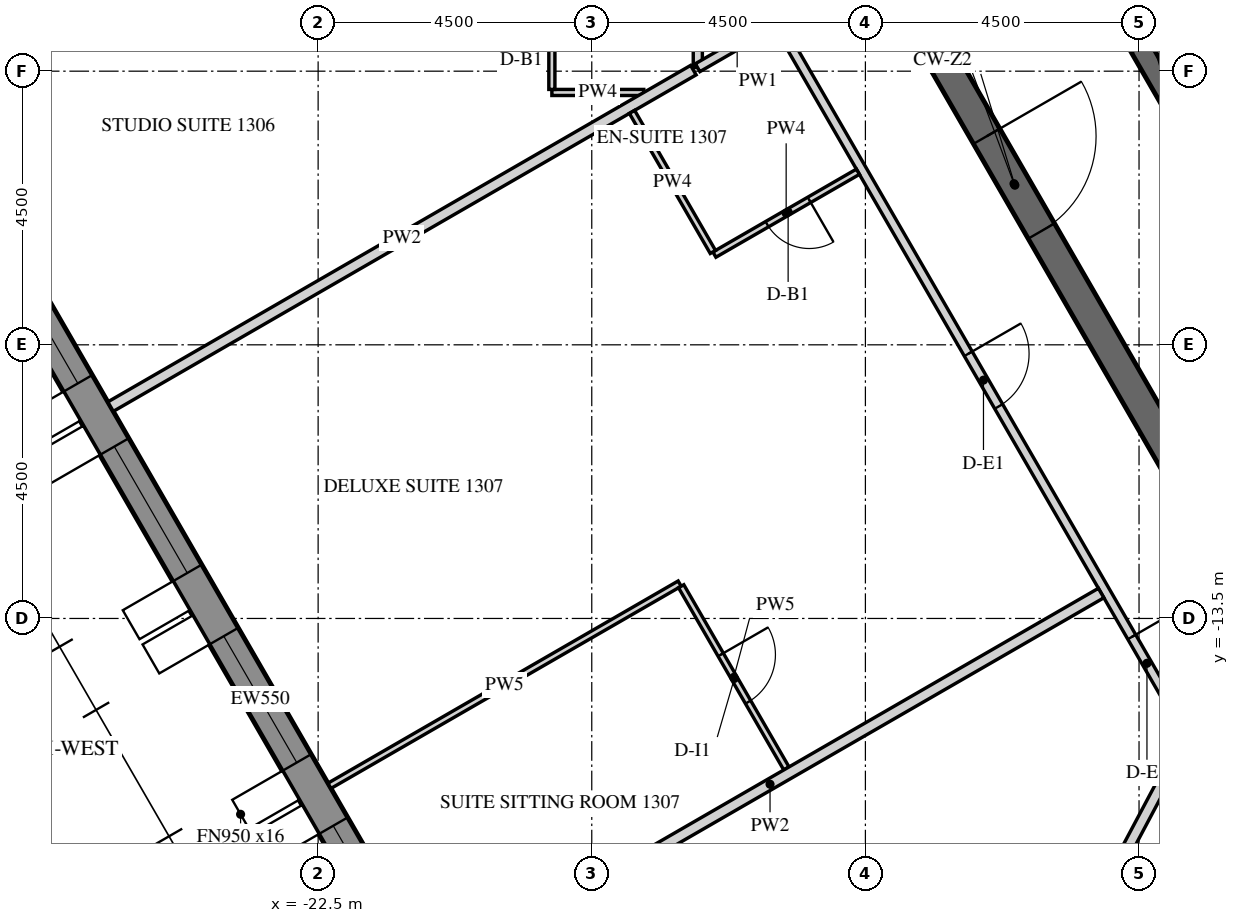
"""IFC4 building model, lengths in metres.
Left out: names, types, materials, properties, quantities, classifications, styles, units other than length and angle.
Written with IfcOpenShell. Run it as: python <this file> out.ifc"""

import sys

from ifc_helpers import new_model, si_unit, direction, frame, frame_2d, origin, place, context, subcontext, project, spatial, polyline, rectangle, outline, extrude, element, fill, save


model = new_model("IFC4")
c1 = context("Model", 3, precision=1e-05, world=origin(), true_north=direction((0.0, 1.0)))
c2 = subcontext(c1, "Body", "Model", "MODEL_VIEW")
j1 = project(units=[si_unit("LENGTHUNIT", "METRE"), si_unit("PLANEANGLEUNIT", "RADIAN")], contexts=[c1])
p1 = place(None, origin())
s1 = spatial("IfcSite", under=j1, at=p1, CompositionType="ELEMENT")
p2 = place(p1, origin())
s2 = spatial("IfcBuilding", under=s1, at=p2, CompositionType="ELEMENT")
p3 = place(p2, frame((0.0, 0.0, 176.1)))
s3 = spatial("IfcBuildingStorey", under=s2, at=p3, CompositionType="ELEMENT", Elevation=176.1)
p4 = place(p3, frame((-30.391, -2.811, -0.15), z_axis=(0.0, 0.0, 1.0), x_axis=(0.499998569178, -0.866026229868, 0.0)))
e1 = element("IfcWall", 1, at=p4, inside=s3, PredefinedType="SOLIDWALL", context=c2, shape_type="SweptSolid", body=[
    extrude(outline(polyline([(-0.022, -0.275), (27.783, -0.275), (27.732, 0.275), (0.022, 0.275), (-0.022, -0.275)])), origin(), (0.0, 0.0, 1.0), 3.9),
])
p5 = place(p4, frame((1.879, 0.0, 1.05)))
e2 = element("IfcOpeningElement", 2, at=p5, cuts=e1, PredefinedType="OPENING", context=c2, shape_type="SweptSolid", body=[
    extrude(rectangle(XDim=2.4, YDim=2.4, at=frame_2d((1.2, 1.2))), frame((0.0, 0.285, 0.0), z_axis=(0.0, -1.0, 0.0), x_axis=(1.0, 0.0, 0.0)), (0.0, 0.0, 1.0), 0.57),
])
p6 = place(p4, frame((5.479, 0.0, 1.05)))
e3 = element("IfcOpeningElement", 3, at=p6, cuts=e1, PredefinedType="OPENING", context=c2, shape_type="SweptSolid", body=[
    extrude(rectangle(XDim=2.4, YDim=2.4, at=frame_2d((1.2, 1.2))), frame((0.0, 0.285, 0.0), z_axis=(0.0, -1.0, 0.0), x_axis=(1.0, 0.0, 0.0)), (0.0, 0.0, 1.0), 0.57),
])
p7 = place(p4, frame((9.079, 0.0, 1.05)))
e4 = element("IfcOpeningElement", 4, at=p7, cuts=e1, PredefinedType="OPENING", context=c2, shape_type="SweptSolid", body=[
    extrude(rectangle(XDim=2.4, YDim=2.4, at=frame_2d((1.2, 1.2))), frame((0.0, 0.285, 0.0), z_axis=(0.0, -1.0, 0.0), x_axis=(1.0, 0.0, 0.0)), (0.0, 0.0, 1.0), 0.57),
])
p8 = place(p4, frame((12.679, 0.0, 1.05)))
e5 = element("IfcOpeningElement", 5, at=p8, cuts=e1, PredefinedType="OPENING", context=c2, shape_type="SweptSolid", body=[
    extrude(rectangle(XDim=2.4, YDim=2.4, at=frame_2d((1.2, 1.2))), frame((0.0, 0.285, 0.0), z_axis=(0.0, -1.0, 0.0), x_axis=(1.0, 0.0, 0.0)), (0.0, 0.0, 1.0), 0.57),
])
p9 = place(p4, frame((16.279, 0.0, 1.05)))
e6 = element("IfcOpeningElement", 6, at=p9, cuts=e1, PredefinedType="OPENING", context=c2, shape_type="SweptSolid", body=[
    extrude(rectangle(XDim=2.4, YDim=2.4, at=frame_2d((1.2, 1.2))), frame((0.0, 0.285, 0.0), z_axis=(0.0, -1.0, 0.0), x_axis=(1.0, 0.0, 0.0)), (0.0, 0.0, 1.0), 0.57),
])
p10 = place(p4, frame((19.879, 0.0, 1.05)))
e7 = element("IfcOpeningElement", 7, at=p10, cuts=e1, PredefinedType="OPENING", context=c2, shape_type="SweptSolid", body=[
    extrude(rectangle(XDim=2.4, YDim=2.4, at=frame_2d((1.2, 1.2))), frame((0.0, 0.285, 0.0), z_axis=(0.0, -1.0, 0.0), x_axis=(1.0, 0.0, 0.0)), (0.0, 0.0, 1.0), 0.57),
])
p11 = place(p4, frame((23.479, 0.0, 1.05)))
e8 = element("IfcOpeningElement", 8, at=p11, cuts=e1, PredefinedType="OPENING", context=c2, shape_type="SweptSolid", body=[
    extrude(rectangle(XDim=2.4, YDim=2.4, at=frame_2d((1.2, 1.2))), frame((0.0, 0.285, 0.0), z_axis=(0.0, -1.0, 0.0), x_axis=(1.0, 0.0, 0.0)), (0.0, 0.0, 1.0), 0.57),
])
p12 = place(p3, frame((-14.722, 0.0, -0.15), z_axis=(0.0, 0.0, 1.0), x_axis=(0.50000571537, -0.866022103989, 0.0)))
e9 = element("IfcWall", 9, at=p12, inside=s3, PredefinedType="SHEAR", context=c2, shape_type="SweptSolid", body=[
    extrude(outline(polyline([(-0.144, -0.25), (14.867, -0.25), (14.578, 0.25), (0.144, 0.25), (-0.144, -0.25)])), origin(), (0.0, 0.0, 1.0), 3.9),
])
p13 = place(p12, frame((6.432, 0.0, 0.15)))
e10 = element("IfcOpeningElement", 10, at=p13, cuts=e9, PredefinedType="OPENING", context=c2, shape_type="SweptSolid", body=[
    extrude(rectangle(XDim=1.8, YDim=2.4, at=frame_2d((0.9, 1.2))), frame((0.0, 0.26, 0.0), z_axis=(0.0, -1.0, 0.0), x_axis=(1.0, 0.0, 0.0)), (0.0, 0.0, 1.0), 0.52),
])
p14 = place(p3, frame((-11.345, 0.0, -0.15), z_axis=(0.0, 0.0, 1.0), x_axis=(0.499995046907, -0.866028263435, 0.0)))
e11 = element("IfcWall", 11, at=p14, inside=s3, PredefinedType="SHEAR", context=c2, shape_type="SweptSolid", body=[
    extrude(outline(polyline([(-0.101, -0.175), (11.446, -0.175), (11.244, 0.175), (0.101, 0.175), (-0.101, -0.175)])), origin(), (0.0, 0.0, 1.0), 3.9),
])
p15 = place(p14, frame((4.744, 0.0, 0.15)))
e12 = element("IfcOpeningElement", 12, at=p15, cuts=e11, PredefinedType="OPENING", context=c2, shape_type="SweptSolid", body=[
    extrude(rectangle(XDim=1.8, YDim=2.4, at=frame_2d((0.9, 1.2))), frame((0.0, 0.185, 0.0), z_axis=(0.0, -1.0, 0.0), x_axis=(1.0, 0.0, 0.0)), (0.0, 0.0, 1.0), 0.37),
])
p16 = place(p3, frame((-16.256, -2.125, 0.0), z_axis=(0.0, 0.0, 1.0), x_axis=(0.0, -1.0, 0.0)))
e13 = element("IfcWall", 13, at=p16, inside=s3, PredefinedType="PARTITIONING", context=c2, shape_type="SweptSolid", body=[
    extrude(rectangle(XDim=2.316, YDim=0.15, at=frame_2d((1.158, 0.0))), origin(), (0.0, 0.0, 1.0), 2.988),
])
p17 = place(p3, frame((-14.921, -3.757, 0.0), z_axis=(0.0, 0.0, 1.0), x_axis=(0.500001980452, -0.866024260367, 0.0)))
e14 = element("IfcWall", 14, at=p17, inside=s3, PredefinedType="PARTITIONING", context=c2, shape_type="SweptSolid", body=[
    extrude(rectangle(XDim=12.752, YDim=0.15, at=frame_2d((6.376, 0.0))), origin(), (0.0, 0.0, 1.0), 2.988),
])
p18 = place(p17, frame((6.225, 0.0, 0.0)))
e15 = element("IfcOpeningElement", 15, at=p18, cuts=e14, PredefinedType="OPENING", context=c2, shape_type="SweptSolid", body=[
    extrude(rectangle(XDim=1.0, YDim=2.1, at=frame_2d((0.5, 1.05))), frame((0.0, 0.085, 0.0), z_axis=(0.0, -1.0, 0.0), x_axis=(1.0, 0.0, 0.0)), (0.0, 0.0, 1.0), 0.17),
])
p19 = place(p17, frame((11.602, 0.0, 0.0)))
e16 = element("IfcOpeningElement", 16, at=p19, cuts=e14, PredefinedType="OPENING", context=c2, shape_type="SweptSolid", body=[
    extrude(rectangle(XDim=1.0, YDim=2.1, at=frame_2d((0.5, 1.05))), frame((0.0, 0.085, 0.0), z_axis=(0.0, -1.0, 0.0), x_axis=(1.0, 0.0, 0.0)), (0.0, 0.0, 1.0), 0.17),
])
p20 = place(p3, frame((-16.259, -4.443, 0.0), z_axis=(0.0, 0.0, 1.0), x_axis=(0.866004263386, 0.500036614457, 0.0)))
e17 = element("IfcWall", 17, at=p20, inside=s3, PredefinedType="PARTITIONING", context=c2, shape_type="SweptSolid", body=[
    extrude(rectangle(XDim=1.502, YDim=0.15, at=frame_2d((0.751, 0.0))), origin(), (0.0, 0.0, 1.0), 2.988),
])
p21 = place(p3, frame((-17.145, -4.85, 0.0), z_axis=(0.0, 0.0, 1.0), x_axis=(-1.0, 0.0, 0.0)))
e18 = element("IfcWall", 18, at=p21, inside=s3, PredefinedType="PARTITIONING", context=c2, shape_type="SweptSolid", body=[
    extrude(rectangle(XDim=1.511, YDim=0.1, at=frame_2d((0.756, 0.0))), origin(), (0.0, 0.0, 1.0), 2.988),
])
p22 = place(p3, frame((-18.656, -4.8, 0.0), z_axis=(0.0, 0.0, 1.0), x_axis=(0.0, 1.0, 0.0)))
e19 = element("IfcWall", 19, at=p22, inside=s3, PredefinedType="PARTITIONING", context=c2, shape_type="SweptSolid", body=[
    extrude(rectangle(XDim=2.675, YDim=0.1, at=frame_2d((1.337, 0.0))), origin(), (0.0, 0.0, 1.0), 2.988),
])
p23 = place(p22, frame((0.95, 0.0, 0.0)))
e20 = element("IfcOpeningElement", 20, at=p23, cuts=e19, PredefinedType="OPENING", context=c2, shape_type="SweptSolid", body=[
    extrude(rectangle(XDim=0.8, YDim=2.1, at=frame_2d((0.4, 1.05))), frame((0.0, 0.06, 0.0), z_axis=(0.0, -1.0, 0.0), x_axis=(1.0, 0.0, 0.0)), (0.0, 0.0, 1.0), 0.12),
])
p24 = place(p3, frame((-25.914, -10.017, 0.0), z_axis=(0.0, 0.0, 1.0), x_axis=(0.866021744024, 0.500006338837, 0.0)))
e21 = element("IfcWall", 21, at=p24, inside=s3, PredefinedType="PARTITIONING", context=c2, shape_type="SweptSolid", body=[
    extrude(rectangle(XDim=11.067, YDim=0.18, at=frame_2d((5.534, 0.0))), origin(), (0.0, 0.0, 1.0), 2.988),
])
p25 = place(p3, frame((-13.623, -6.154, 0.0), z_axis=(0.0, 0.0, 1.0), x_axis=(-0.866051307416, -0.49995513091, 0.0)))
e22 = element("IfcWall", 22, at=p25, inside=s3, PredefinedType="PARTITIONING", context=c2, shape_type="SweptSolid", body=[
    extrude(rectangle(XDim=2.725, YDim=0.1, at=frame_2d((1.362, 0.0))), origin(), (0.0, 0.0, 1.0), 2.988),
])
p26 = place(p25, frame((0.925, 0.0, 0.0)))
e23 = element("IfcOpeningElement", 23, at=p26, cuts=e22, PredefinedType="OPENING", context=c2, shape_type="SweptSolid", body=[
    extrude(rectangle(XDim=0.8, YDim=2.1, at=frame_2d((0.4, 1.05))), frame((0.0, 0.06, 0.0), z_axis=(0.0, -1.0, 0.0), x_axis=(1.0, 0.0, 0.0)), (0.0, 0.0, 1.0), 0.12),
])
p27 = place(p3, frame((-16.008, -7.473, 0.0), z_axis=(0.0, 0.0, 1.0), x_axis=(-0.500008456887, 0.866020521143, 0.0)))
e24 = element("IfcWall", 24, at=p27, inside=s3, PredefinedType="PARTITIONING", context=c2, shape_type="SweptSolid", body=[
    extrude(rectangle(XDim=2.66, YDim=0.1, at=frame_2d((1.33, 0.0))), origin(), (0.0, 0.0, 1.0), 2.988),
])
p28 = place(p3, frame((-22.313, -16.252, 0.0), z_axis=(0.0, 0.0, 1.0), x_axis=(0.866027239912, 0.49999681972, 0.0)))
e25 = element("IfcWall", 25, at=p28, inside=s3, PredefinedType="PARTITIONING", context=c2, shape_type="SweptSolid", body=[
    extrude(rectangle(XDim=6.65, YDim=0.1, at=frame_2d((3.325, 0.0))), origin(), (0.0, 0.0, 1.0), 2.988),
])
p29 = place(p3, frame((-16.529, -12.97, 0.0), z_axis=(0.0, 0.0, 1.0), x_axis=(0.499978980201, -0.866037539231, 0.0)))
e26 = element("IfcWall", 26, at=p29, inside=s3, PredefinedType="PARTITIONING", context=c2, shape_type="SweptSolid", body=[
    extrude(rectangle(XDim=3.46, YDim=0.1, at=frame_2d((1.73, 0.0))), origin(), (0.0, 0.0, 1.0), 2.988),
])
p30 = place(p29, frame((1.3, 0.0, 0.0)))
e27 = element("IfcOpeningElement", 27, at=p30, cuts=e26, PredefinedType="OPENING", context=c2, shape_type="SweptSolid", body=[
    extrude(rectangle(XDim=0.9, YDim=2.1, at=frame_2d((0.45, 1.05))), frame((0.0, 0.06, 0.0), z_axis=(0.0, -1.0, 0.0), x_axis=(1.0, 0.0, 0.0)), (0.0, 0.0, 1.0), 0.12),
])
p31 = place(p3, frame((-20.513, -19.37, 0.0), z_axis=(0.0, 0.0, 1.0), x_axis=(0.866019402111, 0.500010395058, 0.0)))
e28 = element("IfcWall", 28, at=p31, inside=s3, PredefinedType="PARTITIONING", context=c2, shape_type="SweptSolid", body=[
    extrude(rectangle(XDim=12.575, YDim=0.18, at=frame_2d((6.288, 0.0))), origin(), (0.0, 0.0, 1.0), 2.988),
])
p32 = place(p3, frame((-14.876, -27.977, 0.0), z_axis=(0.0, 0.0, 1.0), x_axis=(0.469475175214, 0.882945672088, 0.0)))
e29 = element("IfcWall", 29, at=p32, inside=s3, PredefinedType="PARTITIONING", context=c2, shape_type="SweptSolid", body=[
    extrude(rectangle(XDim=14.839, YDim=0.18, at=frame_2d((7.419, 0.0))), origin(), (0.0, 0.0, 1.0), 2.988),
])
p33 = place(p6, frame((0.0, 0.205, 0.0)))
e30 = element("IfcWindow", 30, at=p33, inside=s3, PartitioningType="DOUBLE_PANEL_VERTICAL", PredefinedType="WINDOW", context=c2, shape_type="SweptSolid", body=[
    extrude(rectangle(XDim=2.4, YDim=2.4, at=frame_2d((1.2, 1.2))), frame((0.0, 0.03, 0.0), z_axis=(0.0, -1.0, 0.0), x_axis=(1.0, 0.0, 0.0)), (0.0, 0.0, 1.0), 0.06),
])
fill(e3, e30)
p34 = place(p7, frame((0.0, 0.205, 0.0)))
e31 = element("IfcWindow", 31, at=p34, inside=s3, PartitioningType="DOUBLE_PANEL_VERTICAL", PredefinedType="WINDOW", context=c2, shape_type="SweptSolid", body=[
    extrude(rectangle(XDim=2.4, YDim=2.4, at=frame_2d((1.2, 1.2))), frame((0.0, 0.03, 0.0), z_axis=(0.0, -1.0, 0.0), x_axis=(1.0, 0.0, 0.0)), (0.0, 0.0, 1.0), 0.06),
])
fill(e4, e31)
p35 = place(p8, frame((0.0, 0.205, 0.0)))
e32 = element("IfcWindow", 32, at=p35, inside=s3, PartitioningType="DOUBLE_PANEL_VERTICAL", PredefinedType="WINDOW", context=c2, shape_type="SweptSolid", body=[
    extrude(rectangle(XDim=2.4, YDim=2.4, at=frame_2d((1.2, 1.2))), frame((0.0, 0.03, 0.0), z_axis=(0.0, -1.0, 0.0), x_axis=(1.0, 0.0, 0.0)), (0.0, 0.0, 1.0), 0.06),
])
fill(e5, e32)
p36 = place(p9, frame((0.0, 0.205, 0.0)))
e33 = element("IfcWindow", 33, at=p36, inside=s3, PartitioningType="DOUBLE_PANEL_VERTICAL", PredefinedType="WINDOW", context=c2, shape_type="SweptSolid", body=[
    extrude(rectangle(XDim=2.4, YDim=2.4, at=frame_2d((1.2, 1.2))), frame((0.0, 0.03, 0.0), z_axis=(0.0, -1.0, 0.0), x_axis=(1.0, 0.0, 0.0)), (0.0, 0.0, 1.0), 0.06),
])
fill(e6, e33)
p37 = place(p13, origin())
e34 = element("IfcDoor", 34, at=p37, inside=s3, OperationType="DOUBLE_DOOR_SINGLE_SWING", PredefinedType="DOOR", context=c2, shape_type="SweptSolid", body=[
    extrude(rectangle(XDim=1.8, YDim=2.4, at=frame_2d((0.9, 1.2))), frame((0.0, 0.025, 0.0), z_axis=(0.0, -1.0, 0.0), x_axis=(1.0, 0.0, 0.0)), (0.0, 0.0, 1.0), 0.05),
])
fill(e10, e34)
p38 = place(p15, origin())
e35 = element("IfcDoor", 35, at=p38, inside=s3, OperationType="DOUBLE_DOOR_SINGLE_SWING", PredefinedType="DOOR", context=c2, shape_type="SweptSolid", body=[
    extrude(rectangle(XDim=1.8, YDim=2.4, at=frame_2d((0.9, 1.2))), frame((0.0, 0.025, 0.0), z_axis=(0.0, -1.0, 0.0), x_axis=(1.0, 0.0, 0.0)), (0.0, 0.0, 1.0), 0.05),
])
fill(e12, e35)
p39 = place(p18, origin())
e36 = element("IfcDoor", 36, at=p39, inside=s3, OperationType="SINGLE_SWING_LEFT", PredefinedType="DOOR", context=c2, shape_type="SweptSolid", body=[
    extrude(rectangle(XDim=1.0, YDim=2.1, at=frame_2d((0.5, 1.05))), frame((0.0, 0.025, 0.0), z_axis=(0.0, -1.0, 0.0), x_axis=(1.0, 0.0, 0.0)), (0.0, 0.0, 1.0), 0.05),
])
fill(e15, e36)
p40 = place(p26, origin())
e37 = element("IfcDoor", 37, at=p40, inside=s3, OperationType="SINGLE_SWING_RIGHT", PredefinedType="DOOR", context=c2, shape_type="SweptSolid", body=[
    extrude(rectangle(XDim=0.8, YDim=2.1, at=frame_2d((0.4, 1.05))), frame((0.0, 0.025, 0.0), z_axis=(0.0, -1.0, 0.0), x_axis=(1.0, 0.0, 0.0)), (0.0, 0.0, 1.0), 0.05),
])
fill(e23, e37)
p41 = place(p30, origin())
e38 = element("IfcDoor", 38, at=p41, inside=s3, OperationType="SINGLE_SWING_LEFT", PredefinedType="DOOR", context=c2, shape_type="SweptSolid", body=[
    extrude(rectangle(XDim=0.9, YDim=2.1, at=frame_2d((0.45, 1.05))), frame((0.0, 0.025, 0.0), z_axis=(0.0, -1.0, 0.0), x_axis=(1.0, 0.0, 0.0)), (0.0, 0.0, 1.0), 0.05),
])
fill(e27, e38)
p42 = place(p19, origin())
e39 = element("IfcDoor", 39, at=p42, inside=s3, OperationType="SINGLE_SWING_LEFT", PredefinedType="DOOR", context=c2, shape_type="SweptSolid", body=[
    extrude(rectangle(XDim=1.0, YDim=2.1, at=frame_2d((0.5, 1.05))), frame((0.0, 0.025, 0.0), z_axis=(0.0, -1.0, 0.0), x_axis=(1.0, 0.0, 0.0)), (0.0, 0.0, 1.0), 0.05),
])
fill(e16, e39)
save(model, sys.argv[1])
